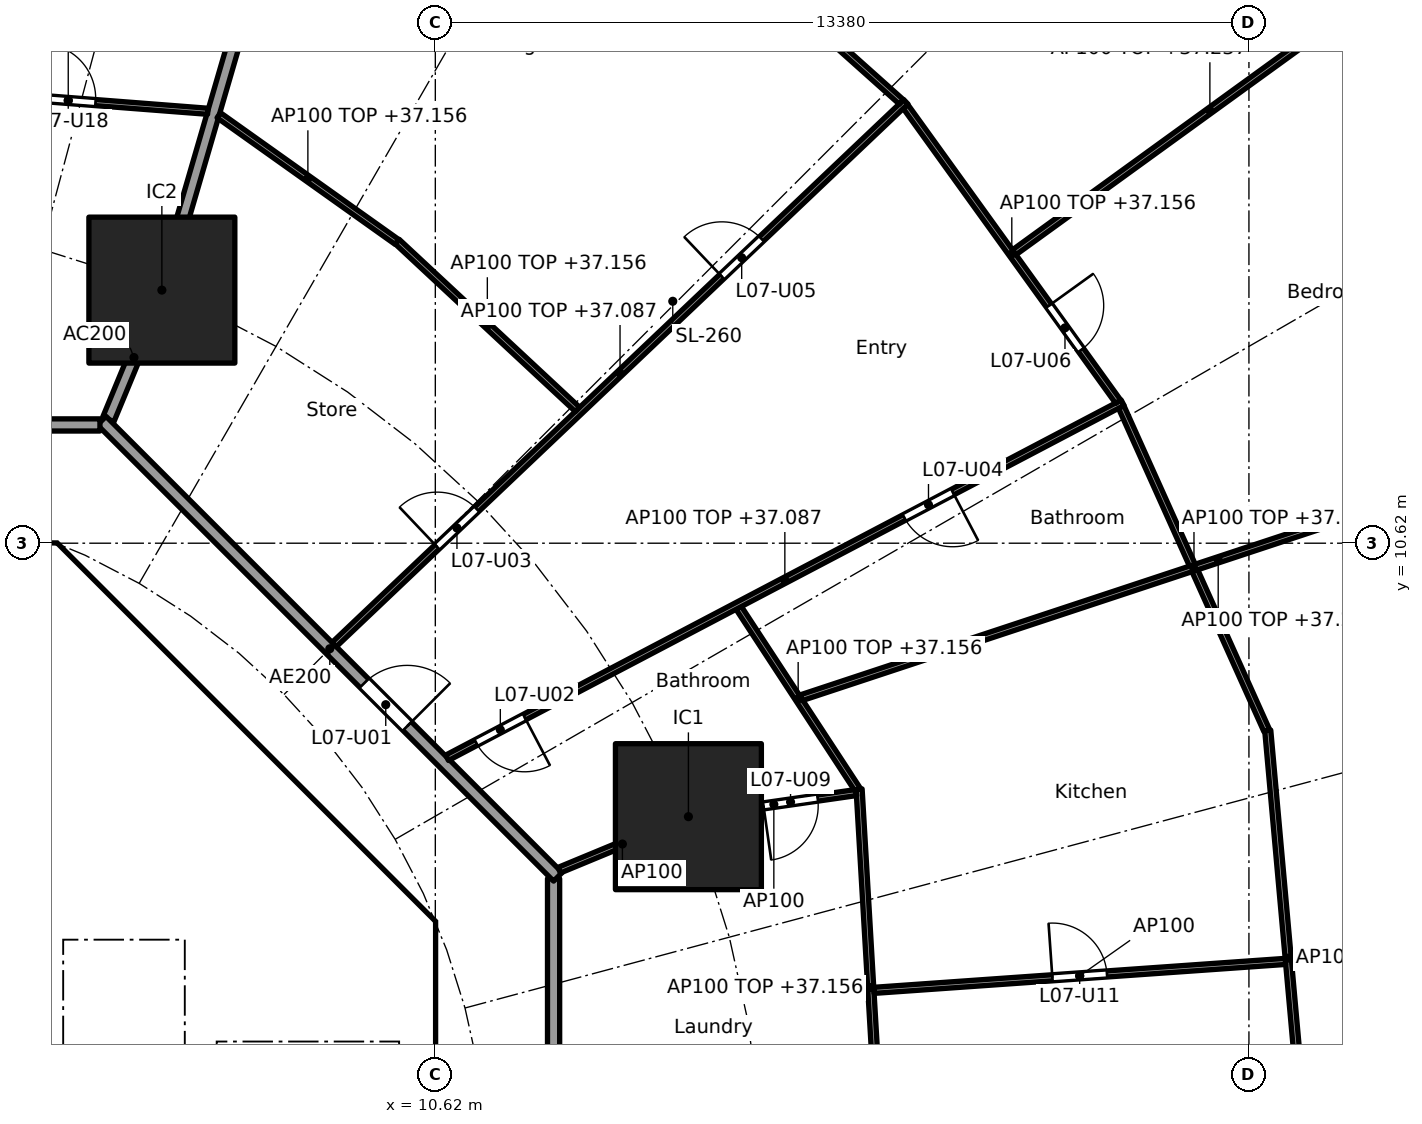
"""IFC4 building model, lengths in metres.
Left out: names, types, materials, properties, quantities, classifications, styles, units other than length and angle.
Written with IfcOpenShell. Run it as: python <this file> out.ifc"""

import sys

from ifc_helpers import new_model, si_unit, direction, frame, frame_2d, origin, origin_2d, place, context, subcontext, project, spatial, polyline, rectangle, outline, extrude, element, fill, save


model = new_model("IFC4")
c1 = context("Model", 3, precision=1e-05, world=origin(), true_north=direction((0.0, 1.0)))
c2 = subcontext(c1, "Body", "Model", "MODEL_VIEW")
j1 = project(units=[si_unit("LENGTHUNIT", "METRE"), si_unit("PLANEANGLEUNIT", "RADIAN")], contexts=[c1])
p1 = place(None, origin())
s1 = spatial("IfcSite", under=j1, at=p1, CompositionType="ELEMENT")
p2 = place(p1, origin())
s2 = spatial("IfcBuilding", under=s1, at=p2, CompositionType="ELEMENT")
p3 = place(p2, frame((0.0, 0.0, 34.4)))
s3 = spatial("IfcBuildingStorey", under=s2, at=p3, CompositionType="ELEMENT", Elevation=34.4)
for number, where, z_axis, x_axis in (
    (1, (14.782, 6.123, 0.0), (0.0, 0.0, 1.0), (1.0, 0.0, 0.0)),
    (2, (6.123, 14.782, 0.0), (0.0, 0.0, 1.0), (1.0, 0.0, 0.0)),
):
    element("IfcColumn", number, at=place(p3, frame(where, z_axis=z_axis, x_axis=x_axis)), inside=s3, PredefinedType="COLUMN", context=c2, shape_type="SweptSolid", body=[
        extrude(rectangle(XDim=2.4, YDim=2.4, at=origin_2d()), origin(), (0.0, 0.0, 1.0), 3.7),
    ])
p4 = place(p3, frame((9.988, 4.613, 0.0), z_axis=(0.0, 0.0, 1.0), x_axis=(-0.707106781187, 0.707106781187, 0.0)))
e3 = element("IfcWall", 3, at=p4, inside=s3, PredefinedType="SHEAR", context=c2, shape_type="SweptSolid", body=[
    extrude(rectangle(XDim=7.602, YDim=0.6, at=frame_2d((3.801, 0.0))), origin(), (0.0, 0.0, 1.0), 3.44),
])
p5 = place(p4, frame((3.201, 0.0, 0.0)))
e4 = element("IfcOpeningElement", 4, at=p5, cuts=e3, PredefinedType="OPENING", context=c2, shape_type="SweptSolid", body=[
    extrude(rectangle(XDim=1.2, YDim=2.1, at=frame_2d((0.6, 1.05))), frame((0.0, 0.31, 0.0), z_axis=(0.0, -1.0, 0.0), x_axis=(1.0, 0.0, 0.0)), (0.0, 0.0, 1.0), 0.62),
])
p6 = place(p3, frame((6.7, 4.0, 0.0), z_axis=(0.0, 0.0, 1.0), x_axis=(1.0, 0.0, 0.0)))
e5 = element("IfcWall", 5, at=p6, inside=s3, PredefinedType="SOLIDWALL", context=c2, shape_type="SweptSolid", body=[
    extrude(rectangle(XDim=3.325, YDim=0.2, at=frame_2d((1.662, 0.0))), origin(), (0.0, 0.0, 1.0), 3.44),
])
p7 = place(p6, frame((1.25, 0.0, 0.0)))
e6 = element("IfcOpeningElement", 6, at=p7, cuts=e5, PredefinedType="OPENING", context=c2, shape_type="SweptSolid", body=[
    extrude(rectangle(XDim=1.1, YDim=2.1, at=frame_2d((0.55, 1.05))), frame((0.0, 0.11, 0.0), z_axis=(0.0, -1.0, 0.0), x_axis=(1.0, 0.0, 0.0)), (0.0, 0.0, 1.0), 0.22),
])
p8 = place(p3, origin())
e7 = element("IfcWall", 7, at=p8, inside=s3, PredefinedType="SHEAR", context=c2, shape_type="SweptSolid", body=[
    extrude(outline(polyline([(-4.152, 10.025), (-4.401, 9.776), (-4.825, 10.2), (-4.401, 10.625), (4.401, 10.625), (4.825, 10.2), (4.401, 9.776), (4.152, 10.025), (-4.152, 10.025)])), origin(), (0.0, 0.0, 1.0), 3.44),
])
p9 = place(p3, origin())
e8 = element("IfcWall", 8, at=p9, inside=s3, PredefinedType="SHEAR", context=c2, shape_type="SweptSolid", body=[
    extrude(outline(polyline([(9.776, -4.401), (10.025, -4.152), (10.025, -3.801), (10.025, 4.152), (9.776, 4.401), (10.2, 4.825), (10.625, 4.401), (10.625, -4.401), (10.2, -4.825), (9.776, -4.401)])), origin(), (0.0, 0.0, 1.0), 3.44),
])
p10 = place(p3, origin())
e9 = element("IfcWall", 9, at=p10, inside=s3, PredefinedType="SOLIDWALL", context=c2, shape_type="SweptSolid", body=[
    extrude(outline(polyline([(-6.5, 2.1), (-6.7, 2.1), (-6.7, 4.3), (6.7, 4.3), (6.7, 2.1), (6.5, 2.1), (6.5, 4.1), (4.5, 4.1), (4.5, 2.1), (4.3, 2.1), (4.3, 4.1), (2.3, 4.1), (2.3, 2.1), (2.1, 2.1), (2.1, 4.1), (0.1, 4.1), (0.1, 2.1), (-0.1, 2.1), (-0.1, 4.1), (-2.1, 4.1), (-2.1, 2.1), (-2.3, 2.1), (-2.3, 4.1), (-4.3, 4.1), (-4.3, 2.1), (-4.5, 2.1), (-4.5, 4.1), (-6.5, 4.1), (-6.5, 2.1)])), origin(), (0.0, 0.0, 1.0), 3.44),
])
p11 = place(p3, origin())
e10 = element("IfcWall", 10, at=p11, inside=s3, PredefinedType="SOLIDWALL", context=c2, shape_type="SweptSolid", body=[
    extrude(outline(polyline([(7.025, -3.9), (6.7, -3.9), (6.7, 3.9), (7.025, 3.9), (7.025, -3.9)])), origin(), (0.0, 0.0, 1.0), 3.44),
])
p12 = place(p3, frame((5.243, 12.657, 0.0), z_axis=(0.0, 0.0, 1.0), x_axis=(0.382707856524, 0.923869415315, 0.0)))
e11 = element("IfcWall", 11, at=p12, inside=s3, PredefinedType="PARTITIONING", context=c2, shape_type="SweptSolid", body=[
    extrude(rectangle(XDim=2.2, YDim=0.2, at=frame_2d((1.1, 0.0))), origin(), (0.0, 0.0, 1.0), 3.44),
])
p13 = place(p3, frame((6.137, 14.83, 0.0), z_axis=(0.0, 0.0, 1.0), x_axis=(0.27985745069, 0.960041565399, 0.0)))
e12 = element("IfcWall", 12, at=p13, inside=s3, PredefinedType="PARTITIONING", context=c2, shape_type="SweptSolid", body=[
    extrude(rectangle(XDim=16.705, YDim=0.2, at=frame_2d((8.353, 0.0))), origin(), (0.0, 0.0, 1.0), 2.756),
])
p14 = place(p3, frame((12.565, -5.104, 0.0), z_axis=(0.0, 0.0, 1.0), x_axis=(0.0, 1.0, 0.0)))
e13 = element("IfcWall", 13, at=p14, inside=s3, PredefinedType="PARTITIONING", context=c2, shape_type="SweptSolid", body=[
    extrude(rectangle(XDim=10.209, YDim=0.2, at=frame_2d((5.104, 0.0))), origin(), (0.0, 0.0, 1.0), 3.44),
])
p15 = place(p3, frame((12.635, 5.134, 0.0), z_axis=(0.0, 0.0, 1.0), x_axis=(-0.707106781187, 0.707106781187, 0.0)))
e14 = element("IfcWall", 14, at=p15, inside=s3, PredefinedType="PARTITIONING", context=c2, shape_type="SweptSolid", body=[
    extrude(rectangle(XDim=10.609, YDim=0.2, at=frame_2d((5.305, 0.0))), origin(), (0.0, 0.0, 1.0), 3.44),
])
p16 = place(p15, frame((3.503, 0.0, 0.0)))
e15 = element("IfcOpeningElement", 15, at=p16, cuts=e14, PredefinedType="OPENING", context=c2, shape_type="SweptSolid", body=[
    extrude(rectangle(XDim=1.0, YDim=2.1, at=frame_2d((0.5, 1.05))), frame((0.0, 0.11, 0.0), z_axis=(0.0, -1.0, 0.0), x_axis=(1.0, 0.0, 0.0)), (0.0, 0.0, 1.0), 0.22),
])
p17 = place(p3, frame((5.104, 12.565, 0.0), z_axis=(0.0, 0.0, 1.0), x_axis=(-1.0, 0.0, 0.0)))
e16 = element("IfcWall", 16, at=p17, inside=s3, PredefinedType="PARTITIONING", context=c2, shape_type="SweptSolid", body=[
    extrude(rectangle(XDim=10.409, YDim=0.2, at=frame_2d((5.205, 0.0))), origin(), (0.0, 0.0, 1.0), 3.44),
])
p18 = place(p17, frame((6.339, 0.0, 0.0)))
e17 = element("IfcOpeningElement", 17, at=p18, cuts=e16, PredefinedType="OPENING", context=c2, shape_type="SweptSolid", body=[
    extrude(rectangle(XDim=1.0, YDim=2.1, at=frame_2d((0.5, 1.05))), frame((0.0, 0.11, 0.0), z_axis=(0.0, -1.0, 0.0), x_axis=(1.0, 0.0, 0.0)), (0.0, 0.0, 1.0), 0.22),
])
p19 = place(p3, frame((17.971, 0.05, 0.0), z_axis=(0.0, 0.0, 1.0), x_axis=(-0.058476853647, 0.998288764631, 0.0)))
e18 = element("IfcWall", 18, at=p19, inside=s3, PredefinedType="PARTITIONING", context=c2, shape_type="SweptSolid", body=[
    extrude(rectangle(XDim=6.538, YDim=0.1, at=frame_2d((3.269, 0.0))), origin(), (0.0, 0.0, 1.0), 2.756),
])
p20 = place(p19, frame((1.159, 0.0, 0.0)))
e19 = element("IfcOpeningElement", 19, at=p20, cuts=e18, PredefinedType="OPENING", context=c2, shape_type="SweptSolid", body=[
    extrude(rectangle(XDim=0.9, YDim=2.1, at=frame_2d((0.45, 1.05))), frame((0.0, 0.06, 0.0), z_axis=(0.0, -1.0, 0.0), x_axis=(1.0, 0.0, 0.0)), (0.0, 0.0, 1.0), 0.12),
])
p21 = place(p3, frame((24.982, 0.05, 0.0), z_axis=(0.0, 0.0, 1.0), x_axis=(-0.089444214321, 0.995991833563, 0.0)))
e20 = element("IfcWall", 20, at=p21, inside=s3, PredefinedType="PARTITIONING", context=c2, shape_type="SweptSolid", body=[
    extrude(rectangle(XDim=7.523, YDim=0.1, at=frame_2d((3.761, 0.0))), origin(), (0.0, 0.0, 1.0), 2.756),
])
p22 = place(p3, frame((17.833, 3.267, 0.0), z_axis=(0.0, 0.0, 1.0), x_axis=(0.997537184513, 0.070139614438, 0.0)))
e21 = element("IfcWall", 21, at=p22, inside=s3, PredefinedType="PARTITIONING", context=c2, shape_type="SweptSolid", body=[
    extrude(rectangle(XDim=6.784, YDim=0.1, at=frame_2d((3.392, 0.0))), origin(), (0.0, 0.0, 1.0), 3.44),
])
p23 = place(p22, frame((2.942, 0.0, 0.0)))
e22 = element("IfcOpeningElement", 22, at=p23, cuts=e21, PredefinedType="OPENING", context=c2, shape_type="SweptSolid", body=[
    extrude(rectangle(XDim=0.9, YDim=2.1, at=frame_2d((0.45, 1.05))), frame((0.0, 0.06, 0.0), z_axis=(0.0, -1.0, 0.0), x_axis=(1.0, 0.0, 0.0)), (0.0, 0.0, 1.0), 0.12),
])
p24 = place(p3, frame((12.657, 5.243, 0.0), z_axis=(0.0, 0.0, 1.0), x_axis=(0.923864733477, 0.382719158442, 0.0)))
e23 = element("IfcWall", 23, at=p24, inside=s3, PredefinedType="PARTITIONING", context=c2, shape_type="SweptSolid", body=[
    extrude(rectangle(XDim=2.25, YDim=0.1, at=frame_2d((1.125, 0.0))), origin(), (0.0, 0.0, 1.0), 3.44),
])
p25 = place(p3, frame((14.832, 6.13, 0.0), z_axis=(0.0, 0.0, 1.0), x_axis=(0.989840446863, 0.142182593007, 0.0)))
e24 = element("IfcWall", 24, at=p25, inside=s3, PredefinedType="PARTITIONING", context=c2, shape_type="SweptSolid", body=[
    extrude(rectangle(XDim=2.739, YDim=0.1, at=frame_2d((1.369, 0.0))), origin(), (0.0, 0.0, 1.0), 3.44),
])
p26 = place(p25, frame((1.197, 0.0, 0.0)))
e25 = element("IfcOpeningElement", 25, at=p26, cuts=e24, PredefinedType="OPENING", context=c2, shape_type="SweptSolid", body=[
    extrude(rectangle(XDim=0.9, YDim=2.1, at=frame_2d((0.45, 1.05))), frame((0.0, 0.06, 0.0), z_axis=(0.0, -1.0, 0.0), x_axis=(1.0, 0.0, 0.0)), (0.0, 0.0, 1.0), 0.12),
])
p27 = place(p3, frame((17.564, 6.569, 0.0), z_axis=(0.0, 0.0, 1.0), x_axis=(-0.547641765292, 0.836712911881, 0.0)))
e26 = element("IfcWall", 26, at=p27, inside=s3, PredefinedType="PARTITIONING", context=c2, shape_type="SweptSolid", body=[
    extrude(rectangle(XDim=3.57, YDim=0.1, at=frame_2d((1.785, 0.0))), origin(), (0.0, 0.0, 1.0), 2.756),
])
p28 = place(p3, frame((24.293, 7.538, 0.0), z_axis=(0.0, 0.0, 1.0), x_axis=(-0.410197710154, 0.911996622025, 0.0)))
e27 = element("IfcWall", 27, at=p28, inside=s3, PredefinedType="PARTITIONING", context=c2, shape_type="SweptSolid", body=[
    extrude(rectangle(XDim=5.837, YDim=0.1, at=frame_2d((2.918, 0.0))), origin(), (0.0, 0.0, 1.0), 2.756),
])
p29 = place(p3, frame((16.635, 8.078, 0.0), z_axis=(0.0, 0.0, 1.0), x_axis=(0.949412285442, 0.314032342684, 0.0)))
e28 = element("IfcWall", 28, at=p29, inside=s3, PredefinedType="PARTITIONING", context=c2, shape_type="SweptSolid", body=[
    extrude(rectangle(XDim=14.451, YDim=0.1, at=frame_2d((7.226, 0.0))), origin(), (0.0, 0.0, 1.0), 2.837),
])
p30 = place(p3, frame((10.813, 7.091, 0.0), z_axis=(0.0, 0.0, 1.0), x_axis=(0.885182649479, 0.465243674928, 0.0)))
e29 = element("IfcWall", 29, at=p30, inside=s3, PredefinedType="PARTITIONING", context=c2, shape_type="SweptSolid", body=[
    extrude(rectangle(XDim=12.551, YDim=0.1, at=frame_2d((6.275, 0.0))), origin(), (0.0, 0.0, 1.0), 2.687),
])
p31 = place(p30, frame((0.539, 0.0, 0.0)))
e30 = element("IfcOpeningElement", 30, at=p31, cuts=e29, PredefinedType="OPENING", context=c2, shape_type="SweptSolid", body=[
    extrude(rectangle(XDim=0.9, YDim=2.1, at=frame_2d((0.45, 1.05))), frame((0.0, 0.06, 0.0), z_axis=(0.0, -1.0, 0.0), x_axis=(1.0, 0.0, 0.0)), (0.0, 0.0, 1.0), 0.12),
])
p32 = place(p30, frame((8.494, 0.0, 0.0)))
e31 = element("IfcOpeningElement", 31, at=p32, cuts=e29, PredefinedType="OPENING", context=c2, shape_type="SweptSolid", body=[
    extrude(rectangle(XDim=0.9, YDim=2.1, at=frame_2d((0.45, 1.05))), frame((0.0, 0.06, 0.0), z_axis=(0.0, -1.0, 0.0), x_axis=(1.0, 0.0, 0.0)), (0.0, 0.0, 1.0), 0.12),
])
p33 = place(p3, frame((21.849, 12.948, 0.0), z_axis=(0.0, 0.0, 1.0), x_axis=(-0.584563700282, 0.811347817099, 0.0)))
e32 = element("IfcWall", 32, at=p33, inside=s3, PredefinedType="PARTITIONING", context=c2, shape_type="SweptSolid", body=[
    extrude(rectangle(XDim=5.984, YDim=0.1, at=frame_2d((2.992, 0.0))), origin(), (0.0, 0.0, 1.0), 2.756),
])
p34 = place(p33, frame((1.046, 0.0, 0.0)))
e33 = element("IfcOpeningElement", 33, at=p34, cuts=e32, PredefinedType="OPENING", context=c2, shape_type="SweptSolid", body=[
    extrude(rectangle(XDim=0.9, YDim=2.1, at=frame_2d((0.45, 1.05))), frame((0.0, 0.06, 0.0), z_axis=(0.0, -1.0, 0.0), x_axis=(1.0, 0.0, 0.0)), (0.0, 0.0, 1.0), 0.12),
])
p35 = place(p3, frame((20.141, 15.405, 0.0), z_axis=(0.0, 0.0, 1.0), x_axis=(0.809834895779, 0.58665785734, 0.0)))
e34 = element("IfcWall", 34, at=p35, inside=s3, PredefinedType="PARTITIONING", context=c2, shape_type="SweptSolid", body=[
    extrude(rectangle(XDim=7.945, YDim=0.1, at=frame_2d((3.973, 0.0))), origin(), (0.0, 0.0, 1.0), 2.837),
])
p36 = place(p3, frame((8.957, 8.953, 0.0), z_axis=(0.0, 0.0, 1.0), x_axis=(0.725250022034, 0.688485588476, 0.0)))
e35 = element("IfcWall", 35, at=p36, inside=s3, PredefinedType="PARTITIONING", context=c2, shape_type="SweptSolid", body=[
    extrude(rectangle(XDim=12.963, YDim=0.1, at=frame_2d((6.481, 0.0))), origin(), (0.0, 0.0, 1.0), 2.687),
])
p37 = place(p36, frame((2.333, 0.0, 0.0)))
e36 = element("IfcOpeningElement", 36, at=p37, cuts=e35, PredefinedType="OPENING", context=c2, shape_type="SweptSolid", body=[
    extrude(rectangle(XDim=0.9, YDim=2.1, at=frame_2d((0.45, 1.05))), frame((0.0, 0.06, 0.0), z_axis=(0.0, -1.0, 0.0), x_axis=(1.0, 0.0, 0.0)), (0.0, 0.0, 1.0), 0.12),
])
p38 = place(p36, frame((8.79, 0.0, 0.0)))
e37 = element("IfcOpeningElement", 37, at=p38, cuts=e35, PredefinedType="OPENING", context=c2, shape_type="SweptSolid", body=[
    extrude(rectangle(XDim=0.9, YDim=2.1, at=frame_2d((0.45, 1.05))), frame((0.0, 0.06, 0.0), z_axis=(0.0, -1.0, 0.0), x_axis=(1.0, 0.0, 0.0)), (0.0, 0.0, 1.0), 0.12),
])
p39 = place(p3, frame((12.958, 12.82, 0.0), z_axis=(0.0, 0.0, 1.0), x_axis=(-0.732028724098, 0.681273768096, 0.0)))
e38 = element("IfcWall", 38, at=p39, inside=s3, PredefinedType="PARTITIONING", context=c2, shape_type="SweptSolid", body=[
    extrude(rectangle(XDim=4.05, YDim=0.1, at=frame_2d((2.025, 0.0))), origin(), (0.0, 0.0, 1.0), 2.756),
])
p40 = place(p3, frame((18.285, 17.877, 0.0), z_axis=(0.0, 0.0, 1.0), x_axis=(-0.745806142791, 0.666163041136, 0.0)))
e39 = element("IfcWall", 39, at=p40, inside=s3, PredefinedType="PARTITIONING", context=c2, shape_type="SweptSolid", body=[
    extrude(rectangle(XDim=5.831, YDim=0.1, at=frame_2d((2.915, 0.0))), origin(), (0.0, 0.0, 1.0), 2.756),
])
p41 = place(p40, frame((2.465, 0.0, 0.0)))
e40 = element("IfcOpeningElement", 40, at=p41, cuts=e39, PredefinedType="OPENING", context=c2, shape_type="SweptSolid", body=[
    extrude(rectangle(XDim=0.9, YDim=2.1, at=frame_2d((0.45, 1.05))), frame((0.0, 0.06, 0.0), z_axis=(0.0, -1.0, 0.0), x_axis=(1.0, 0.0, 0.0)), (0.0, 0.0, 1.0), 0.12),
])
p42 = place(p3, frame((9.989, 15.574, 0.0), z_axis=(0.0, 0.0, 1.0), x_axis=(-0.81492039338, 0.57957290521, 0.0)))
e41 = element("IfcWall", 41, at=p42, inside=s3, PredefinedType="PARTITIONING", context=c2, shape_type="SweptSolid", body=[
    extrude(rectangle(XDim=3.594, YDim=0.1, at=frame_2d((1.797, 0.0))), origin(), (0.0, 0.0, 1.0), 2.756),
])
p43 = place(p3, frame((6.878, 17.723, 0.0), z_axis=(0.0, 0.0, 1.0), x_axis=(-0.99701850123, 0.077162868047, 0.0)))
e42 = element("IfcWall", 42, at=p43, inside=s3, PredefinedType="PARTITIONING", context=c2, shape_type="SweptSolid", body=[
    extrude(rectangle(XDim=4.604, YDim=0.1, at=frame_2d((2.302, 0.0))), origin(), (0.0, 0.0, 1.0), 2.756),
])
p44 = place(p43, frame((1.852, 0.0, 0.0)))
e43 = element("IfcOpeningElement", 43, at=p44, cuts=e42, PredefinedType="OPENING", context=c2, shape_type="SweptSolid", body=[
    extrude(rectangle(XDim=0.9, YDim=2.1, at=frame_2d((0.45, 1.05))), frame((0.0, 0.06, 0.0), z_axis=(0.0, -1.0, 0.0), x_axis=(1.0, 0.0, 0.0)), (0.0, 0.0, 1.0), 0.12),
])
p45 = place(p7, frame((1.1, 0.0, 0.0), x_axis=(-1.0, 0.0, 0.0)))
e44 = element("IfcDoor", 44, at=p45, inside=s3, OperationType="SINGLE_SWING_RIGHT", PredefinedType="DOOR", context=c2, shape_type="SweptSolid", body=[
    extrude(rectangle(XDim=1.1, YDim=2.1, at=frame_2d((0.55, 1.05))), frame((0.0, 0.025, 0.0), z_axis=(0.0, -1.0, 0.0), x_axis=(1.0, 0.0, 0.0)), (0.0, 0.0, 1.0), 0.05),
])
fill(e6, e44)
p46 = place(p5, origin())
e45 = element("IfcDoor", 45, at=p46, inside=s3, OperationType="SINGLE_SWING_RIGHT", PredefinedType="DOOR", context=c2, shape_type="SweptSolid", body=[
    extrude(rectangle(XDim=1.2, YDim=2.1, at=frame_2d((0.6, 1.05))), frame((0.0, 0.025, 0.0), z_axis=(0.0, -1.0, 0.0), x_axis=(1.0, 0.0, 0.0)), (0.0, 0.0, 1.0), 0.05),
])
fill(e4, e45)
p47 = place(p16, frame((1.0, 0.0, 0.0), x_axis=(-1.0, 0.0, 0.0)))
e46 = element("IfcDoor", 46, at=p47, inside=s3, OperationType="SINGLE_SWING_RIGHT", PredefinedType="DOOR", context=c2, shape_type="SweptSolid", body=[
    extrude(rectangle(XDim=1.0, YDim=2.1, at=frame_2d((0.5, 1.05))), frame((0.0, 0.025, 0.0), z_axis=(0.0, -1.0, 0.0), x_axis=(1.0, 0.0, 0.0)), (0.0, 0.0, 1.0), 0.05),
])
fill(e15, e46)
p48 = place(p31, frame((0.9, 0.0, 0.0), x_axis=(-1.0, 0.0, 0.0)))
e47 = element("IfcDoor", 47, at=p48, inside=s3, OperationType="SINGLE_SWING_LEFT", PredefinedType="DOOR", context=c2, shape_type="SweptSolid", body=[
    extrude(rectangle(XDim=0.9, YDim=2.1, at=frame_2d((0.45, 1.05))), frame((0.0, 0.025, 0.0), z_axis=(0.0, -1.0, 0.0), x_axis=(1.0, 0.0, 0.0)), (0.0, 0.0, 1.0), 0.05),
])
fill(e30, e47)
p49 = place(p37, origin())
e48 = element("IfcDoor", 48, at=p49, inside=s3, OperationType="SINGLE_SWING_LEFT", PredefinedType="DOOR", context=c2, shape_type="SweptSolid", body=[
    extrude(rectangle(XDim=0.9, YDim=2.1, at=frame_2d((0.45, 1.05))), frame((0.0, 0.025, 0.0), z_axis=(0.0, -1.0, 0.0), x_axis=(1.0, 0.0, 0.0)), (0.0, 0.0, 1.0), 0.05),
])
fill(e36, e48)
p50 = place(p32, frame((0.9, 0.0, 0.0), x_axis=(-1.0, 0.0, 0.0)))
e49 = element("IfcDoor", 49, at=p50, inside=s3, OperationType="SINGLE_SWING_LEFT", PredefinedType="DOOR", context=c2, shape_type="SweptSolid", body=[
    extrude(rectangle(XDim=0.9, YDim=2.1, at=frame_2d((0.45, 1.05))), frame((0.0, 0.025, 0.0), z_axis=(0.0, -1.0, 0.0), x_axis=(1.0, 0.0, 0.0)), (0.0, 0.0, 1.0), 0.05),
])
fill(e31, e49)
p51 = place(p38, origin())
e50 = element("IfcDoor", 50, at=p51, inside=s3, OperationType="SINGLE_SWING_LEFT", PredefinedType="DOOR", context=c2, shape_type="SweptSolid", body=[
    extrude(rectangle(XDim=0.9, YDim=2.1, at=frame_2d((0.45, 1.05))), frame((0.0, 0.025, 0.0), z_axis=(0.0, -1.0, 0.0), x_axis=(1.0, 0.0, 0.0)), (0.0, 0.0, 1.0), 0.05),
])
fill(e37, e50)
p52 = place(p34, frame((0.9, 0.0, 0.0), x_axis=(-1.0, 0.0, 0.0)))
e51 = element("IfcDoor", 51, at=p52, inside=s3, OperationType="SINGLE_SWING_LEFT", PredefinedType="DOOR", context=c2, shape_type="SweptSolid", body=[
    extrude(rectangle(XDim=0.9, YDim=2.1, at=frame_2d((0.45, 1.05))), frame((0.0, 0.025, 0.0), z_axis=(0.0, -1.0, 0.0), x_axis=(1.0, 0.0, 0.0)), (0.0, 0.0, 1.0), 0.05),
])
fill(e33, e51)
p53 = place(p26, frame((0.9, 0.0, 0.0), x_axis=(-1.0, 0.0, 0.0)))
e52 = element("IfcDoor", 52, at=p53, inside=s3, OperationType="SINGLE_SWING_RIGHT", PredefinedType="DOOR", context=c2, shape_type="SweptSolid", body=[
    extrude(rectangle(XDim=0.9, YDim=2.1, at=frame_2d((0.45, 1.05))), frame((0.0, 0.025, 0.0), z_axis=(0.0, -1.0, 0.0), x_axis=(1.0, 0.0, 0.0)), (0.0, 0.0, 1.0), 0.05),
])
fill(e25, e52)
p54 = place(p23, origin())
e53 = element("IfcDoor", 53, at=p54, inside=s3, OperationType="SINGLE_SWING_LEFT", PredefinedType="DOOR", context=c2, shape_type="SweptSolid", body=[
    extrude(rectangle(XDim=0.9, YDim=2.1, at=frame_2d((0.45, 1.05))), frame((0.0, 0.025, 0.0), z_axis=(0.0, -1.0, 0.0), x_axis=(1.0, 0.0, 0.0)), (0.0, 0.0, 1.0), 0.05),
])
fill(e22, e53)
p55 = place(p44, frame((0.9, 0.0, 0.0), x_axis=(-1.0, 0.0, 0.0)))
e54 = element("IfcDoor", 54, at=p55, inside=s3, OperationType="SINGLE_SWING_LEFT", PredefinedType="DOOR", context=c2, shape_type="SweptSolid", body=[
    extrude(rectangle(XDim=0.9, YDim=2.1, at=frame_2d((0.45, 1.05))), frame((0.0, 0.025, 0.0), z_axis=(0.0, -1.0, 0.0), x_axis=(1.0, 0.0, 0.0)), (0.0, 0.0, 1.0), 0.05),
])
fill(e43, e54)
save(model, sys.argv[1])
